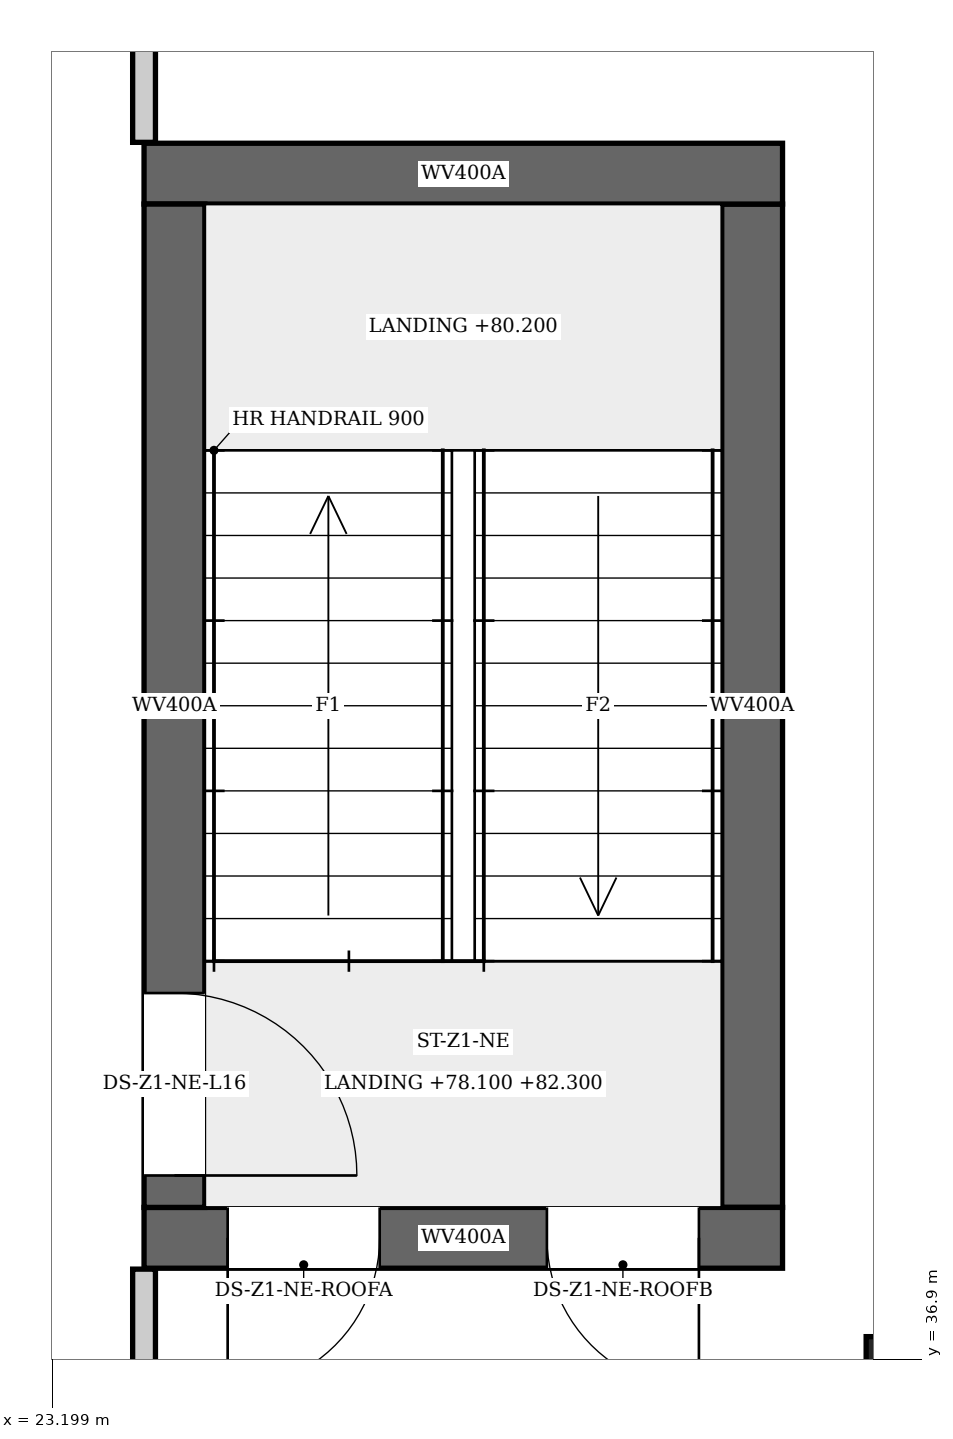
"""IFC4 building model, lengths in metres.
Left out: names, types, materials, properties, quantities, classifications, styles, units other than length and angle.
Written with IfcOpenShell. Run it as: python <this file> out.ifc"""

import sys

from ifc_helpers import new_model, si_unit, direction, frame, frame_2d, origin, origin_2d, place, context, subcontext, project, spatial, rectangle, extrude, element, fill, save


model = new_model("IFC4")
c1 = context("Model", 3, precision=1e-05, world=origin(), true_north=direction((0.0, 1.0)))
c2 = subcontext(c1, "Body", "Model", "MODEL_VIEW")
j1 = project(units=[si_unit("LENGTHUNIT", "METRE"), si_unit("PLANEANGLEUNIT", "RADIAN")], contexts=[c1])
p1 = place(None, origin())
s1 = spatial("IfcSite", under=j1, at=p1, CompositionType="ELEMENT")
p2 = place(p1, origin())
s2 = spatial("IfcBuilding", under=s1, at=p2, CompositionType="ELEMENT")
p3 = place(p2, frame((0.0, 0.0, 78.1)))
s3 = spatial("IfcBuildingStorey", under=s2, at=p3, CompositionType="ELEMENT", Elevation=78.1)
p4 = place(p3, frame((23.8, 37.7, 0.0), z_axis=(0.0, 0.0, 1.0), x_axis=(1.0, 0.0, 0.0)))
e1 = element("IfcWall", 1, at=p4, inside=s3, PredefinedType="SHEAR", context=c2, shape_type="SweptSolid", body=[
    extrude(rectangle(XDim=4.2, YDim=0.4, at=frame_2d((2.1, 0.0))), origin(), (0.0, 0.0, 1.0), 7.1),
])
p5 = place(p4, frame((0.55, 0.0, 4.2)))
e2 = element("IfcOpeningElement", 2, at=p5, cuts=e1, PredefinedType="OPENING", context=c2, shape_type="SweptSolid", body=[
    extrude(rectangle(XDim=1.0, YDim=2.1, at=frame_2d((0.5, 1.05))), frame((0.0, 0.21, 0.0), z_axis=(0.0, -1.0, 0.0), x_axis=(1.0, 0.0, 0.0)), (0.0, 0.0, 1.0), 0.42),
])
p6 = place(p4, frame((2.65, 0.0, 4.2)))
e3 = element("IfcOpeningElement", 3, at=p6, cuts=e1, PredefinedType="OPENING", context=c2, shape_type="SweptSolid", body=[
    extrude(rectangle(XDim=1.0, YDim=2.1, at=frame_2d((0.5, 1.05))), frame((0.0, 0.21, 0.0), z_axis=(0.0, -1.0, 0.0), x_axis=(1.0, 0.0, 0.0)), (0.0, 0.0, 1.0), 0.42),
])
p7 = place(p3, frame((23.8, 44.7, 0.0), z_axis=(0.0, 0.0, 1.0), x_axis=(1.0, 0.0, 0.0)))
e4 = element("IfcWall", 4, at=p7, inside=s3, PredefinedType="SHEAR", context=c2, shape_type="SweptSolid", body=[
    extrude(rectangle(XDim=4.2, YDim=0.4, at=frame_2d((2.1, 0.0))), origin(), (0.0, 0.0, 1.0), 7.1),
])
p8 = place(p3, frame((24.0, 37.9, 0.0), z_axis=(0.0, 0.0, 1.0), x_axis=(0.0, 1.0, 0.0)))
e5 = element("IfcWall", 5, at=p8, inside=s3, PredefinedType="SHEAR", context=c2, shape_type="SweptSolid", body=[
    extrude(rectangle(XDim=6.6, YDim=0.4, at=frame_2d((3.3, 0.0))), origin(), (0.0, 0.0, 1.0), 7.1),
])
p9 = place(p8, frame((0.21, 0.0, 0.0)))
e6 = element("IfcOpeningElement", 6, at=p9, cuts=e5, PredefinedType="OPENING", context=c2, shape_type="SweptSolid", body=[
    extrude(rectangle(XDim=1.2, YDim=2.1, at=frame_2d((0.6, 1.05))), frame((0.0, 0.21, 0.0), z_axis=(0.0, -1.0, 0.0), x_axis=(1.0, 0.0, 0.0)), (0.0, 0.0, 1.0), 0.42),
])
p10 = place(p3, frame((27.8, 37.9, 0.0), z_axis=(0.0, 0.0, 1.0), x_axis=(0.0, 1.0, 0.0)))
e7 = element("IfcWall", 7, at=p10, inside=s3, PredefinedType="SHEAR", context=c2, shape_type="SweptSolid", body=[
    extrude(rectangle(XDim=6.6, YDim=0.4, at=frame_2d((3.3, 0.0))), origin(), (0.0, 0.0, 1.0), 7.1),
])
p11 = place(p3, frame((28.8, 36.8, 0.0), z_axis=(0.0, 0.0, 1.0), x_axis=(1.0, 0.0, 0.0)))
e8 = element("IfcColumn", 8, at=p11, inside=s3, PredefinedType="COLUMN", context=c2, shape_type="SweptSolid", body=[
    extrude(rectangle(XDim=0.5, YDim=0.5, at=origin_2d()), origin(), (0.0, 0.0, 1.0), 3.9),
])
p12 = place(p3, frame((23.8, 35.925, 0.0), z_axis=(0.0, 0.0, 1.0), x_axis=(0.0, 1.0, 0.0)))
e9 = element("IfcWall", 9, at=p12, inside=s3, PredefinedType="PARTITIONING", context=c2, shape_type="SweptSolid", body=[
    extrude(rectangle(XDim=1.569, YDim=0.15, at=frame_2d((0.784, 0.0))), origin(), (0.0, 0.0, 1.0), 3.9),
])
p13 = place(p3, frame((23.8, 44.906, 0.0), z_axis=(0.0, 0.0, 1.0), x_axis=(0.0, 1.0, 0.0)))
e10 = element("IfcWall", 10, at=p13, inside=s3, PredefinedType="PARTITIONING", context=c2, shape_type="SweptSolid", body=[
    extrude(rectangle(XDim=1.338, YDim=0.15, at=frame_2d((0.669, 0.0))), origin(), (0.0, 0.0, 1.0), 3.9),
])
p14 = place(p9, origin())
e11 = element("IfcDoor", 11, at=p14, inside=s3, OperationType="SINGLE_SWING_LEFT", PredefinedType="DOOR", context=c2, shape_type="SweptSolid", body=[
    extrude(rectangle(XDim=1.2, YDim=2.1, at=frame_2d((0.6, 1.05))), frame((0.0, 0.025, 0.0), z_axis=(0.0, -1.0, 0.0), x_axis=(1.0, 0.0, 0.0)), (0.0, 0.0, 1.0), 0.05),
])
fill(e6, e11)
p15 = place(p5, frame((1.0, 0.0, 0.0), z_axis=(0.0, 0.0, 1.0), x_axis=(-1.0, 0.0, 0.0)))
e12 = element("IfcDoor", 12, at=p15, inside=s3, OperationType="SINGLE_SWING_LEFT", PredefinedType="DOOR", context=c2, shape_type="SweptSolid", body=[
    extrude(rectangle(XDim=1.0, YDim=2.1, at=frame_2d((0.5, 1.05))), frame((0.0, 0.025, 0.0), z_axis=(0.0, -1.0, 0.0), x_axis=(1.0, 0.0, 0.0)), (0.0, 0.0, 1.0), 0.05),
])
fill(e2, e12)
p16 = place(p6, frame((1.0, 0.0, 0.0), z_axis=(0.0, 0.0, 1.0), x_axis=(-1.0, 0.0, 0.0)))
e13 = element("IfcDoor", 13, at=p16, inside=s3, OperationType="SINGLE_SWING_RIGHT", PredefinedType="DOOR", context=c2, shape_type="SweptSolid", body=[
    extrude(rectangle(XDim=1.0, YDim=2.1, at=frame_2d((0.5, 1.05))), frame((0.0, 0.025, 0.0), z_axis=(0.0, -1.0, 0.0), x_axis=(1.0, 0.0, 0.0)), (0.0, 0.0, 1.0), 0.05),
])
fill(e3, e13)
save(model, sys.argv[1])
